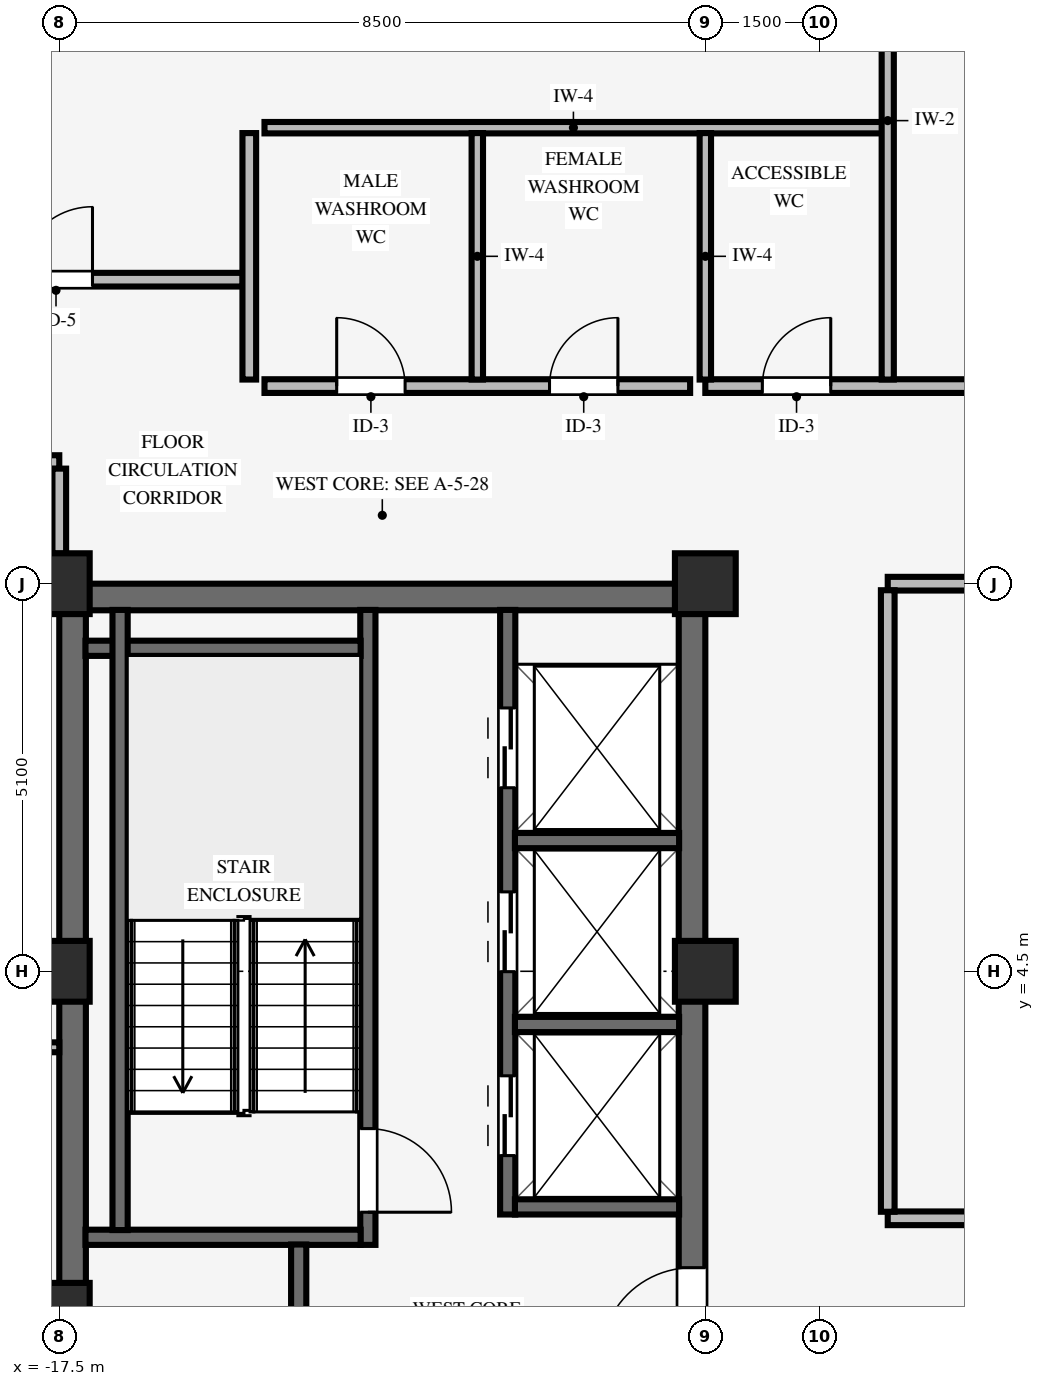
"""IFC4 building model, lengths in metres.
Left out: names, types, materials, properties, quantities, classifications, styles, units other than length and angle.
Written with IfcOpenShell. Run it as: python <this file> out.ifc"""

import sys

from ifc_helpers import new_model, si_unit, direction, frame, frame_2d, origin, origin_2d, place, context, subcontext, project, spatial, rectangle, extrude, source, transform, mapped, element, fill, save


model = new_model("IFC4")
c1 = context("Model", 3, precision=1e-05, world=origin(), true_north=direction((0.0, 1.0)))
c2 = subcontext(c1, "Body", "Model", "MODEL_VIEW")
j1 = project(units=[si_unit("LENGTHUNIT", "METRE"), si_unit("PLANEANGLEUNIT", "RADIAN")], contexts=[c1])
p1 = place(None, origin())
s1 = spatial("IfcSite", under=j1, at=p1, CompositionType="ELEMENT")
p2 = place(p1, origin())
s2 = spatial("IfcBuilding", under=s1, at=p2, CompositionType="ELEMENT")
p3 = place(p2, frame((0.0, 0.0, 257.95)))
s3 = spatial("IfcBuildingStorey", under=s2, at=p3, CompositionType="ELEMENT", Elevation=257.95)
p4 = place(p3, frame((-17.5, 9.425, 0.0), z_axis=(0.0, 0.0, 1.0), x_axis=(1.0, 0.0, 0.0)))
e1 = element("IfcWall", 1, at=p4, inside=s3, PredefinedType="SHEAR", context=c2, shape_type="SweptSolid", body=[
    extrude(rectangle(XDim=8.5, YDim=0.35, at=frame_2d((4.25, 0.0))), origin(), (0.0, 0.0, 1.0), 3.37),
])
p5 = place(p3, frame((-17.325, -9.255, 0.0), z_axis=(0.0, 0.0, 1.0), x_axis=(0.0, 1.0, 0.0)))
e2 = element("IfcWall", 2, at=p5, inside=s3, PredefinedType="SHEAR", context=c2, shape_type="SweptSolid", body=[
    extrude(rectangle(XDim=18.51, YDim=0.35, at=frame_2d((9.255, 0.0))), origin(), (0.0, 0.0, 1.0), 3.37),
])
p6 = place(p3, frame((-9.175, -9.255, 0.0), z_axis=(0.0, 0.0, 1.0), x_axis=(0.0, 1.0, 0.0)))
e3 = element("IfcWall", 3, at=p6, inside=s3, PredefinedType="SHEAR", context=c2, shape_type="SweptSolid", body=[
    extrude(rectangle(XDim=18.51, YDim=0.35, at=frame_2d((9.255, 0.0))), origin(), (0.0, 0.0, 1.0), 3.37),
])
p7 = place(p6, frame((8.655, 0.0, 0.0)))
e4 = element("IfcOpeningElement", 4, at=p7, cuts=e3, PredefinedType="OPENING", context=c2, shape_type="SweptSolid", body=[
    extrude(rectangle(XDim=1.2, YDim=2.15, at=frame_2d((0.6, 1.075))), frame((0.0, 0.185, 0.0), z_axis=(0.0, -1.0, 0.0), x_axis=(1.0, 0.0, 0.0)), (0.0, 0.0, 1.0), 0.37),
])
for number, where, z_axis, x_axis in (
    (5, (-17.5, 4.5, 0.0), (0.0, 0.0, 1.0), (1.0, 0.0, 0.0)),
    (6, (-17.5, 9.6, 0.0), (0.0, 0.0, 1.0), (1.0, 0.0, 0.0)),
    (7, (-9.0, 4.5, 0.0), (0.0, 0.0, 1.0), (1.0, 0.0, 0.0)),
    (8, (-9.0, 9.6, 0.0), (0.0, 0.0, 1.0), (1.0, 0.0, 0.0)),
    (9, (-17.5, 0.0, 0.0), (0.0, 0.0, 1.0), (1.0, 0.0, 0.0)),
):
    element("IfcColumn", number, at=place(p3, frame(where, z_axis=z_axis, x_axis=x_axis)), inside=s3, PredefinedType="COLUMN", context=c2, shape_type="SweptSolid", body=[
        extrude(rectangle(XDim=0.8, YDim=0.8, at=origin_2d()), origin(), (0.0, 0.0, 1.0), 3.37),
    ])
p8 = place(p3, frame((-13.44, 0.9, 0.0), z_axis=(0.0, 0.0, 1.0), x_axis=(0.0, 1.0, 0.0)))
e10 = element("IfcWall", 10, at=p8, inside=s3, PredefinedType="SHEAR", context=c2, shape_type="SweptSolid", body=[
    extrude(rectangle(XDim=8.355, YDim=0.2, at=frame_2d((4.177, 0.0))), origin(), (0.0, 0.0, 1.0), 3.37),
])
p9 = place(p8, frame((1.53, 0.0, 0.0), z_axis=(0.0, 0.0, 1.0), x_axis=(-1.0, 0.0, 0.0)))
e11 = element("IfcOpeningElement", 11, at=p9, cuts=e10, PredefinedType="OPENING", context=c2, shape_type="SweptSolid", body=[
    extrude(rectangle(XDim=1.1, YDim=2.15, at=frame_2d((0.55, 1.075))), frame((0.0, 0.11, 0.0), z_axis=(0.0, -1.0, 0.0), x_axis=(1.0, 0.0, 0.0)), (0.0, 0.0, 1.0), 0.22),
])
for number, where, z_axis, x_axis in (
    (12, (-17.155, 1.0, 0.0), (0.0, 0.0, 1.0), (1.0, 0.0, 0.0)),
    (13, (-17.155, 8.75, 0.0), (0.0, 0.0, 1.0), (1.0, 0.0, 0.0)),
):
    element("IfcWall", number, at=place(p3, frame(where, z_axis=z_axis, x_axis=x_axis)), inside=s3, PredefinedType="SHEAR", context=c2, shape_type="SweptSolid", body=[
        extrude(rectangle(XDim=3.62, YDim=0.2, at=frame_2d((1.81, 0.0))), origin(), (0.0, 0.0, 1.0), 3.37),
    ])
p10 = place(p3, frame((-16.7, 1.095, 0.0), z_axis=(0.0, 0.0, 1.0), x_axis=(0.0, 1.0, 0.0)))
e14 = element("IfcWall", 14, at=p10, inside=s3, PredefinedType="SHEAR", context=c2, shape_type="SweptSolid", body=[
    extrude(rectangle(XDim=8.16, YDim=0.2, at=frame_2d((4.08, 0.0))), origin(), (0.0, 0.0, 1.0), 3.37),
])
p11 = place(p3, frame((-14.35, -6.2, 0.0), z_axis=(0.0, 0.0, 1.0), x_axis=(0.0, 1.0, 0.0)))
e15 = element("IfcWall", 15, at=p11, inside=s3, PredefinedType="SHEAR", context=c2, shape_type="SweptSolid", body=[
    extrude(rectangle(XDim=7.105, YDim=0.2, at=frame_2d((3.552, 0.0))), origin(), (0.0, 0.0, 1.0), 3.37),
])
p12 = place(p11, frame((5.69, 0.0, 0.0), z_axis=(0.0, 0.0, 1.0), x_axis=(-1.0, 0.0, 0.0)))
e16 = element("IfcOpeningElement", 16, at=p12, cuts=e15, PredefinedType="OPENING", context=c2, shape_type="SweptSolid", body=[
    extrude(rectangle(XDim=0.88, YDim=2.1, at=frame_2d((0.44, 1.05))), frame((0.0, 0.11, 0.0), z_axis=(0.0, -1.0, 0.0), x_axis=(1.0, 0.0, 0.0)), (0.0, 0.0, 1.0), 0.22),
])
p13 = place(p11, frame((1.15, 0.0, 0.0)))
e17 = element("IfcOpeningElement", 17, at=p13, cuts=e15, PredefinedType="OPENING", context=c2, shape_type="SweptSolid", body=[
    extrude(rectangle(XDim=1.3, YDim=2.2, at=frame_2d((0.65, 1.1))), frame((0.0, 0.11, 0.0), z_axis=(0.0, -1.0, 0.0), x_axis=(1.0, 0.0, 0.0)), (0.0, 0.0, 1.0), 0.22),
])
p14 = place(p3, frame((-11.6, 1.3, 0.0), z_axis=(0.0, 0.0, 1.0), x_axis=(0.0, 1.0, 0.0)))
e18 = element("IfcWall", 18, at=p14, inside=s3, PredefinedType="SHEAR", context=c2, shape_type="SweptSolid", body=[
    extrude(rectangle(XDim=7.955, YDim=0.2, at=frame_2d((3.978, 0.0))), origin(), (0.0, 0.0, 1.0), 3.37),
])
p15 = place(p14, frame((0.775, 0.0, 0.0)))
e19 = element("IfcOpeningElement", 19, at=p15, cuts=e18, PredefinedType="OPENING", context=c2, shape_type="SweptSolid", body=[
    extrude(rectangle(XDim=1.05, YDim=2.15, at=frame_2d((0.525, 1.075))), frame((0.0, 0.11, 0.0), z_axis=(0.0, -1.0, 0.0), x_axis=(1.0, 0.0, 0.0)), (0.0, 0.0, 1.0), 0.22),
])
p16 = place(p14, frame((3.195, 0.0, 0.0)))
e20 = element("IfcOpeningElement", 20, at=p16, cuts=e18, PredefinedType="OPENING", context=c2, shape_type="SweptSolid", body=[
    extrude(rectangle(XDim=1.05, YDim=2.15, at=frame_2d((0.525, 1.075))), frame((0.0, 0.11, 0.0), z_axis=(0.0, -1.0, 0.0), x_axis=(1.0, 0.0, 0.0)), (0.0, 0.0, 1.0), 0.22),
])
p17 = place(p14, frame((5.615, 0.0, 0.0)))
e21 = element("IfcOpeningElement", 21, at=p17, cuts=e18, PredefinedType="OPENING", context=c2, shape_type="SweptSolid", body=[
    extrude(rectangle(XDim=1.05, YDim=2.15, at=frame_2d((0.525, 1.075))), frame((0.0, 0.11, 0.0), z_axis=(0.0, -1.0, 0.0), x_axis=(1.0, 0.0, 0.0)), (0.0, 0.0, 1.0), 0.22),
])
for number, where, z_axis, x_axis in (
    (22, (-11.505, 1.4, 0.0), (0.0, 0.0, 1.0), (1.0, 0.0, 0.0)),
    (23, (-11.505, 3.8, 0.0), (0.0, 0.0, 1.0), (1.0, 0.0, 0.0)),
    (24, (-11.505, 6.22, 0.0), (0.0, 0.0, 1.0), (1.0, 0.0, 0.0)),
):
    element("IfcWall", number, at=place(p3, frame(where, z_axis=z_axis, x_axis=x_axis)), inside=s3, PredefinedType="SHEAR", context=c2, shape_type="SweptSolid", body=[
        extrude(rectangle(XDim=2.16, YDim=0.2, at=frame_2d((1.08, 0.0))), origin(), (0.0, 0.0, 1.0), 3.37),
    ])
p18 = place(p3, frame((-6.6, 1.25, 0.0), z_axis=(0.0, 0.0, 1.0), x_axis=(1.0, 0.0, 0.0)))
e25 = element("IfcWall", 25, at=p18, inside=s3, PredefinedType="PARTITIONING", context=c2, shape_type="SweptSolid", body=[
    extrude(rectangle(XDim=13.2, YDim=0.18, at=frame_2d((6.6, 0.0))), origin(), (0.0, 0.0, 1.0), 3.36),
])
p19 = place(p18, frame((6.12, 0.0, 0.0)))
e26 = element("IfcOpeningElement", 26, at=p19, cuts=e25, PredefinedType="OPENING", context=c2, shape_type="SweptSolid", body=[
    extrude(rectangle(XDim=0.96, YDim=2.1, at=frame_2d((0.48, 1.05))), frame((0.0, 0.1, 0.0), z_axis=(0.0, -1.0, 0.0), x_axis=(1.0, 0.0, 0.0)), (0.0, 0.0, 1.0), 0.2),
])
p20 = place(p3, frame((-20.7, 3.5, 0.0), z_axis=(0.0, 0.0, 1.0), x_axis=(1.0, 0.0, 0.0)))
e27 = element("IfcWall", 27, at=p20, inside=s3, PredefinedType="PARTITIONING", context=c2, shape_type="SweptSolid", body=[
    extrude(rectangle(XDim=3.2, YDim=0.13, at=frame_2d((1.6, 0.0))), origin(), (0.0, 0.0, 1.0), 3.36),
])
p21 = place(p3, frame((-6.6, 9.6, 0.0), z_axis=(0.0, 0.0, 1.0), x_axis=(1.0, 0.0, 0.0)))
e28 = element("IfcWall", 28, at=p21, inside=s3, PredefinedType="PARTITIONING", context=c2, shape_type="SweptSolid", body=[
    extrude(rectangle(XDim=6.449, YDim=0.18, at=frame_2d((3.225, 0.0))), origin(), (0.0, 0.0, 1.0), 2.405),
])
p22 = place(p3, frame((-20.7, 11.2, 0.0), z_axis=(0.0, 0.0, 1.0), x_axis=(1.0, 0.0, 0.0)))
e29 = element("IfcWall", 29, at=p22, inside=s3, PredefinedType="PARTITIONING", context=c2, shape_type="SweptSolid", body=[
    extrude(rectangle(XDim=3.2, YDim=0.18, at=frame_2d((1.6, 0.0))), origin(), (0.0, 0.0, 1.0), 3.36),
])
p23 = place(p22, frame((1.47, 0.0, 0.0)))
e30 = element("IfcOpeningElement", 30, at=p23, cuts=e29, PredefinedType="OPENING", context=c2, shape_type="SweptSolid", body=[
    extrude(rectangle(XDim=0.96, YDim=2.1, at=frame_2d((0.48, 1.05))), frame((0.0, 0.1, 0.0), z_axis=(0.0, -1.0, 0.0), x_axis=(1.0, 0.0, 0.0)), (0.0, 0.0, 1.0), 0.2),
])
p24 = place(p3, frame((-14.8, 12.2, 0.0), z_axis=(0.0, 0.0, 1.0), x_axis=(1.0, 0.0, 0.0)))
e31 = element("IfcWall", 31, at=p24, inside=s3, PredefinedType="PARTITIONING", context=c2, shape_type="SweptSolid", body=[
    extrude(rectangle(XDim=5.6, YDim=0.18, at=frame_2d((2.8, 0.0))), origin(), (0.0, 0.0, 1.0), 3.36),
])
p25 = place(p24, frame((0.95, 0.0, 0.0)))
e32 = element("IfcOpeningElement", 32, at=p25, cuts=e31, PredefinedType="OPENING", context=c2, shape_type="SweptSolid", body=[
    extrude(rectangle(XDim=0.9, YDim=2.1, at=frame_2d((0.45, 1.05))), frame((0.0, 0.1, 0.0), z_axis=(0.0, -1.0, 0.0), x_axis=(1.0, 0.0, 0.0)), (0.0, 0.0, 1.0), 0.2),
])
p26 = place(p24, frame((3.75, 0.0, 0.0)))
e33 = element("IfcOpeningElement", 33, at=p26, cuts=e31, PredefinedType="OPENING", context=c2, shape_type="SweptSolid", body=[
    extrude(rectangle(XDim=0.9, YDim=2.1, at=frame_2d((0.45, 1.05))), frame((0.0, 0.1, 0.0), z_axis=(0.0, -1.0, 0.0), x_axis=(1.0, 0.0, 0.0)), (0.0, 0.0, 1.0), 0.2),
])
p27 = place(p3, frame((-9.0, 12.2, 0.0), z_axis=(0.0, 0.0, 1.0), x_axis=(1.0, 0.0, 0.0)))
e34 = element("IfcWall", 34, at=p27, inside=s3, PredefinedType="PARTITIONING", context=c2, shape_type="SweptSolid", body=[
    extrude(rectangle(XDim=24.8, YDim=0.18, at=frame_2d((12.4, 0.0))), origin(), (0.0, 0.0, 1.0), 3.36),
])
p28 = place(p27, frame((11.42, 0.0, 0.0)))
e35 = element("IfcOpeningElement", 35, at=p28, cuts=e34, PredefinedType="OPENING", context=c2, shape_type="SweptSolid", body=[
    extrude(rectangle(XDim=0.96, YDim=2.1, at=frame_2d((0.48, 1.05))), frame((0.0, 0.1, 0.0), z_axis=(0.0, -1.0, 0.0), x_axis=(1.0, 0.0, 0.0)), (0.0, 0.0, 1.0), 0.2),
])
p29 = place(p27, frame((4.82, 0.0, 0.0)))
e36 = element("IfcOpeningElement", 36, at=p29, cuts=e34, PredefinedType="OPENING", context=c2, shape_type="SweptSolid", body=[
    extrude(rectangle(XDim=0.96, YDim=2.1, at=frame_2d((0.48, 1.05))), frame((0.0, 0.1, 0.0), z_axis=(0.0, -1.0, 0.0), x_axis=(1.0, 0.0, 0.0)), (0.0, 0.0, 1.0), 0.2),
])
p30 = place(p27, frame((19.52, 0.0, 0.0)))
e37 = element("IfcOpeningElement", 37, at=p30, cuts=e34, PredefinedType="OPENING", context=c2, shape_type="SweptSolid", body=[
    extrude(rectangle(XDim=0.96, YDim=2.1, at=frame_2d((0.48, 1.05))), frame((0.0, 0.1, 0.0), z_axis=(0.0, -1.0, 0.0), x_axis=(1.0, 0.0, 0.0)), (0.0, 0.0, 1.0), 0.2),
])
p31 = place(p27, frame((22.92, 0.0, 0.0)))
e38 = element("IfcOpeningElement", 38, at=p31, cuts=e34, PredefinedType="OPENING", context=c2, shape_type="SweptSolid", body=[
    extrude(rectangle(XDim=0.96, YDim=2.1, at=frame_2d((0.48, 1.05))), frame((0.0, 0.1, 0.0), z_axis=(0.0, -1.0, 0.0), x_axis=(1.0, 0.0, 0.0)), (0.0, 0.0, 1.0), 0.2),
])
p32 = place(p27, frame((0.75, 0.0, 0.0)))
e39 = element("IfcOpeningElement", 39, at=p32, cuts=e34, PredefinedType="OPENING", context=c2, shape_type="SweptSolid", body=[
    extrude(rectangle(XDim=0.9, YDim=2.1, at=frame_2d((0.45, 1.05))), frame((0.0, 0.1, 0.0), z_axis=(0.0, -1.0, 0.0), x_axis=(1.0, 0.0, 0.0)), (0.0, 0.0, 1.0), 0.2),
])
p33 = place(p3, frame((-20.0, 13.6, 0.0), z_axis=(0.0, 0.0, 1.0), x_axis=(1.0, 0.0, 0.0)))
e40 = element("IfcWall", 40, at=p33, inside=s3, PredefinedType="PARTITIONING", context=c2, shape_type="SweptSolid", body=[
    extrude(rectangle(XDim=4.914, YDim=0.18, at=frame_2d((2.457, 0.0))), origin(), (0.0, 0.0, 1.0), 3.038),
])
p34 = place(p33, frame((1.977, 0.0, 0.0)))
e41 = element("IfcOpeningElement", 41, at=p34, cuts=e40, PredefinedType="OPENING", context=c2, shape_type="SweptSolid", body=[
    extrude(rectangle(XDim=0.96, YDim=2.1, at=frame_2d((0.48, 1.05))), frame((0.0, 0.1, 0.0), z_axis=(0.0, -1.0, 0.0), x_axis=(1.0, 0.0, 0.0)), (0.0, 0.0, 1.0), 0.2),
])
p35 = place(p3, frame((-14.8, 15.6, 0.0), z_axis=(0.0, 0.0, 1.0), x_axis=(1.0, 0.0, 0.0)))
e42 = element("IfcWall", 42, at=p35, inside=s3, PredefinedType="PARTITIONING", context=c2, shape_type="SweptSolid", body=[
    extrude(rectangle(XDim=8.129, YDim=0.15, at=frame_2d((4.064, 0.0))), origin(), (0.0, 0.0, 1.0), 3.36),
])
p36 = place(p3, frame((-17.5, 9.996, 0.0), z_axis=(0.0, 0.0, 1.0), x_axis=(0.0, 1.0, 0.0)))
e43 = element("IfcWall", 43, at=p36, inside=s3, PredefinedType="PARTITIONING", context=c2, shape_type="SweptSolid", body=[
    extrude(rectangle(XDim=1.118, YDim=0.18, at=frame_2d((0.559, 0.0))), origin(), (0.0, 0.0, 1.0), 2.892),
])
p37 = place(p3, frame((-15.0, 12.286, 0.0), z_axis=(0.0, 0.0, 1.0), x_axis=(0.0, 1.0, 0.0)))
e44 = element("IfcWall", 44, at=p37, inside=s3, PredefinedType="PARTITIONING", context=c2, shape_type="SweptSolid", body=[
    extrude(rectangle(XDim=3.243, YDim=0.18, at=frame_2d((1.622, 0.0))), origin(), (0.0, 0.0, 1.0), 3.36),
])
p38 = place(p3, frame((-12.0, 12.286, 0.0), z_axis=(0.0, 0.0, 1.0), x_axis=(0.0, 1.0, 0.0)))
e45 = element("IfcWall", 45, at=p38, inside=s3, PredefinedType="PARTITIONING", context=c2, shape_type="SweptSolid", body=[
    extrude(rectangle(XDim=3.243, YDim=0.15, at=frame_2d((1.622, 0.0))), origin(), (0.0, 0.0, 1.0), 3.36),
])
p39 = place(p3, frame((-9.0, 12.286, 0.0), z_axis=(0.0, 0.0, 1.0), x_axis=(0.0, 1.0, 0.0)))
e46 = element("IfcWall", 46, at=p39, inside=s3, PredefinedType="PARTITIONING", context=c2, shape_type="SweptSolid", body=[
    extrude(rectangle(XDim=3.243, YDim=0.15, at=frame_2d((1.622, 0.0))), origin(), (0.0, 0.0, 1.0), 2.892),
])
p40 = place(p3, frame((-6.6, 1.336, 0.0), z_axis=(0.0, 0.0, 1.0), x_axis=(0.0, 1.0, 0.0)))
e47 = element("IfcWall", 47, at=p40, inside=s3, PredefinedType="PARTITIONING", context=c2, shape_type="SweptSolid", body=[
    extrude(rectangle(XDim=8.178, YDim=0.18, at=frame_2d((4.089, 0.0))), origin(), (0.0, 0.0, 1.0), 3.36),
])
p41 = place(p3, frame((-6.6, 12.286, 0.0), z_axis=(0.0, 0.0, 1.0), x_axis=(0.0, 1.0, 0.0)))
e48 = element("IfcWall", 48, at=p41, inside=s3, PredefinedType="PARTITIONING", context=c2, shape_type="SweptSolid", body=[
    extrude(rectangle(XDim=6.814, YDim=0.16, at=frame_2d((3.407, 0.0))), origin(), (0.0, 0.0, 1.0), 3.36),
])
m1 = source(origin(), c2, "Body", "SweptSolid", [
    extrude(rectangle(XDim=1.1, YDim=2.15, at=frame_2d((0.55, 1.075))), frame((0.0, 0.025, 0.0), z_axis=(0.0, -1.0, 0.0), x_axis=(1.0, 0.0, 0.0)), (0.0, 0.0, 1.0), 0.05),
])
p42 = place(p9, origin())
e49 = element("IfcDoor", 49, at=p42, inside=s3, OperationType="SINGLE_SWING_RIGHT", PredefinedType="DOOR", context=c2, shape_type="MappedRepresentation", body=[
    mapped(m1, transform((0.0, 0.0, 0.0), scale=1.0)),
])
fill(e11, e49)
m2 = source(origin(), c2, "Body", "SweptSolid", [
    extrude(rectangle(XDim=1.2, YDim=2.15, at=frame_2d((0.6, 1.075))), frame((0.0, 0.025, 0.0), z_axis=(0.0, -1.0, 0.0), x_axis=(1.0, 0.0, 0.0)), (0.0, 0.0, 1.0), 0.05),
])
p43 = place(p7, origin())
e50 = element("IfcDoor", 50, at=p43, inside=s3, OperationType="SINGLE_SWING_LEFT", PredefinedType="DOOR", context=c2, shape_type="MappedRepresentation", body=[
    mapped(m2, transform((0.0, 0.0, 0.0), scale=1.0)),
])
fill(e4, e50)
m3 = source(origin(), c2, "Body", "SweptSolid", [
    extrude(rectangle(XDim=1.05, YDim=2.15, at=frame_2d((0.525, 1.075))), frame((0.0, 0.025, 0.0), z_axis=(0.0, -1.0, 0.0), x_axis=(1.0, 0.0, 0.0)), (0.0, 0.0, 1.0), 0.05),
])
p44 = place(p15, origin())
e51 = element("IfcDoor", 51, at=p44, inside=s3, OperationType="DOUBLE_DOOR_SLIDING", PredefinedType="DOOR", context=c2, shape_type="MappedRepresentation", body=[
    mapped(m3, transform((0.0, 0.0, 0.0), scale=1.0)),
])
fill(e19, e51)
p45 = place(p16, origin())
e52 = element("IfcDoor", 52, at=p45, inside=s3, OperationType="DOUBLE_DOOR_SLIDING", PredefinedType="DOOR", context=c2, shape_type="MappedRepresentation", body=[
    mapped(m3, transform((0.0, 0.0, 0.0), scale=1.0)),
])
fill(e20, e52)
p46 = place(p17, origin())
e53 = element("IfcDoor", 53, at=p46, inside=s3, OperationType="DOUBLE_DOOR_SLIDING", PredefinedType="DOOR", context=c2, shape_type="MappedRepresentation", body=[
    mapped(m3, transform((0.0, 0.0, 0.0), scale=1.0)),
])
fill(e21, e53)
m4 = source(origin(), c2, "Body", "SweptSolid", [
    extrude(rectangle(XDim=0.96, YDim=2.1, at=frame_2d((0.48, 1.05))), frame((0.0, 0.025, 0.0), z_axis=(0.0, -1.0, 0.0), x_axis=(1.0, 0.0, 0.0)), (0.0, 0.0, 1.0), 0.05),
])
p47 = place(p34, origin())
e54 = element("IfcDoor", 54, at=p47, inside=s3, OperationType="SINGLE_SWING_RIGHT", PredefinedType="DOOR", context=c2, shape_type="MappedRepresentation", body=[
    mapped(m4, transform((0.0, 0.0, 0.0), scale=1.0)),
])
fill(e41, e54)
m5 = source(origin(), c2, "Body", "SweptSolid", [
    extrude(rectangle(XDim=0.9, YDim=2.1, at=frame_2d((0.45, 1.05))), frame((0.0, 0.025, 0.0), z_axis=(0.0, -1.0, 0.0), x_axis=(1.0, 0.0, 0.0)), (0.0, 0.0, 1.0), 0.05),
])
p48 = place(p25, origin())
e55 = element("IfcDoor", 55, at=p48, inside=s3, OperationType="SINGLE_SWING_LEFT", PredefinedType="DOOR", context=c2, shape_type="MappedRepresentation", body=[
    mapped(m5, transform((0.0, 0.0, 0.0), scale=1.0)),
])
fill(e32, e55)
p49 = place(p26, origin())
e56 = element("IfcDoor", 56, at=p49, inside=s3, OperationType="SINGLE_SWING_RIGHT", PredefinedType="DOOR", context=c2, shape_type="MappedRepresentation", body=[
    mapped(m5, transform((0.0, 0.0, 0.0), scale=1.0)),
])
fill(e33, e56)
p50 = place(p32, origin())
e57 = element("IfcDoor", 57, at=p50, inside=s3, OperationType="SINGLE_SWING_RIGHT", PredefinedType="DOOR", context=c2, shape_type="MappedRepresentation", body=[
    mapped(m5, transform((0.0, 0.0, 0.0), scale=1.0)),
])
fill(e39, e57)
save(model, sys.argv[1])
